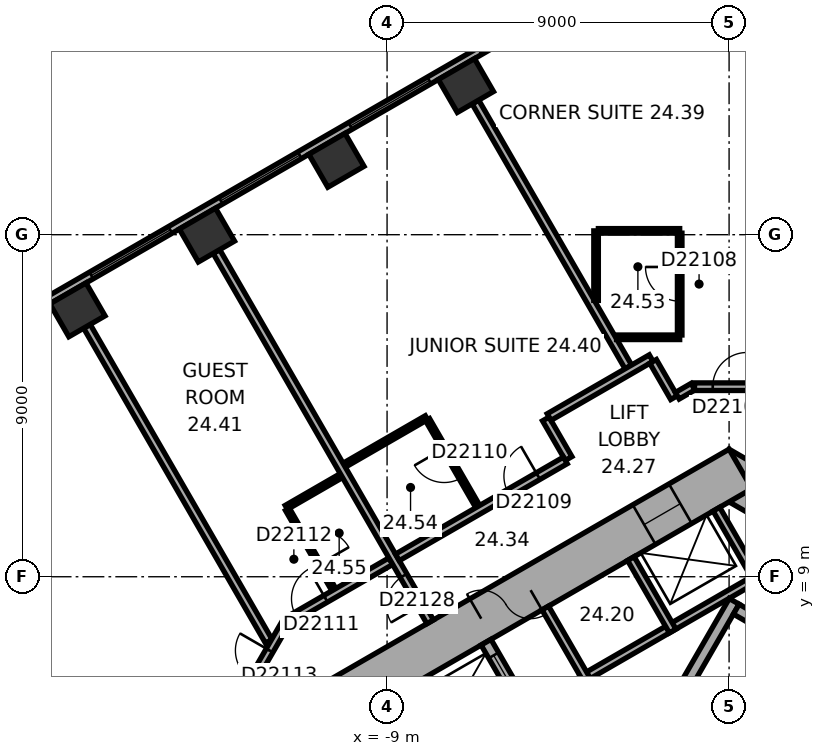
"""IFC4 building model, lengths in metres.
Left out: names, types, materials, properties, quantities, classifications, styles, units other than length and angle.
Written with IfcOpenShell. Run it as: python <this file> out.ifc"""

import sys

from ifc_helpers import new_model, si_unit, direction, frame, frame_2d, origin, origin_2d, place, context, subcontext, project, spatial, rectangle, extrude, element, fill, save


model = new_model("IFC4")
c1 = context("Model", 3, precision=1e-05, world=origin(), true_north=direction((0.0, 1.0)))
c2 = subcontext(c1, "Body", "Model", "MODEL_VIEW")
j1 = project(units=[si_unit("LENGTHUNIT", "METRE"), si_unit("PLANEANGLEUNIT", "RADIAN")], contexts=[c1])
p1 = place(None, origin())
s1 = spatial("IfcSite", under=j1, at=p1, CompositionType="ELEMENT")
p2 = place(p1, origin())
s2 = spatial("IfcBuilding", under=s1, at=p2, CompositionType="ELEMENT")
p3 = place(p2, frame((0.0, 0.0, 103.4)))
s3 = spatial("IfcBuildingStorey", under=s2, at=p3, CompositionType="ELEMENT", Elevation=103.4)
for number, where, z_axis, x_axis in (
    (1, (-6.926, 21.925, 0.0), (0.0, 0.0, 1.0), (-0.866, -0.5, 0.0)),
    (2, (-10.333, 19.957, 0.0), (0.0, 0.0, 1.0), (-0.866, -0.5, 0.0)),
    (3, (-13.74, 17.99, 0.0), (0.0, 0.0, 1.0), (-0.866, -0.5, 0.0)),
    (4, (-17.148, 16.023, 0.0), (0.0, 0.0, 1.0), (-0.866, -0.5, 0.0)),
):
    element("IfcColumn", number, at=place(p3, frame(where, z_axis=z_axis, x_axis=x_axis)), inside=s3, PredefinedType="COLUMN", context=c2, shape_type="SweptSolid", body=[
        extrude(rectangle(XDim=1.1, YDim=1.0, at=origin_2d()), origin(), (0.0, 0.0, 1.0), 3.3),
    ])
p4 = place(p3, frame((10.4, 5.658, 0.0), z_axis=(0.0, 0.0, 1.0), x_axis=(-0.866021384402, 0.500006961711, 0.0)))
e5 = element("IfcWall", 5, at=p4, inside=s3, PredefinedType="SHEAR", context=c2, shape_type="SweptSolid", body=[
    extrude(rectangle(XDim=12.355, YDim=1.2, at=frame_2d((6.178, 0.0))), origin(), (0.0, 0.0, 1.0), 3.3),
])
p5 = place(p4, frame((2.728, 0.0, 0.0)))
e6 = element("IfcOpeningElement", 6, at=p5, cuts=e5, PredefinedType="OPENING", context=c2, shape_type="SweptSolid", body=[
    extrude(rectangle(XDim=1.1, YDim=2.1, at=frame_2d((0.55, 1.05))), frame((0.0, 0.61, 0.0), z_axis=(0.0, -1.0, 0.0), x_axis=(1.0, 0.0, 0.0)), (0.0, 0.0, 1.0), 1.22),
])
p6 = place(p4, frame((5.328, 0.0, 0.0)))
e7 = element("IfcOpeningElement", 7, at=p6, cuts=e5, PredefinedType="OPENING", context=c2, shape_type="SweptSolid", body=[
    extrude(rectangle(XDim=1.1, YDim=2.1, at=frame_2d((0.55, 1.05))), frame((0.0, 0.61, 0.0), z_axis=(0.0, -1.0, 0.0), x_axis=(1.0, 0.0, 0.0)), (0.0, 0.0, 1.0), 1.22),
])
p7 = place(p4, frame((7.928, 0.0, 0.0)))
e8 = element("IfcOpeningElement", 8, at=p7, cuts=e5, PredefinedType="OPENING", context=c2, shape_type="SweptSolid", body=[
    extrude(rectangle(XDim=1.1, YDim=2.1, at=frame_2d((0.55, 1.05))), frame((0.0, 0.61, 0.0), z_axis=(0.0, -1.0, 0.0), x_axis=(1.0, 0.0, 0.0)), (0.0, 0.0, 1.0), 1.22),
])
p8 = place(p3, frame((0.3, 11.836, 0.0), z_axis=(0.0, 0.0, 1.0), x_axis=(-0.866021384402, -0.500006961711, 0.0)))
e9 = element("IfcWall", 9, at=p8, inside=s3, PredefinedType="SHEAR", context=c2, shape_type="SweptSolid", body=[
    extrude(rectangle(XDim=12.355, YDim=1.2, at=frame_2d((6.178, 0.0))), origin(), (0.0, 0.0, 1.0), 3.3),
])
p9 = place(p8, frame((6.378, 0.0, 0.0)))
e10 = element("IfcOpeningElement", 10, at=p9, cuts=e9, PredefinedType="OPENING", context=c2, shape_type="SweptSolid", body=[
    extrude(rectangle(XDim=1.5, YDim=2.1, at=frame_2d((0.75, 1.05))), frame((0.0, 0.61, 0.0), z_axis=(0.0, -1.0, 0.0), x_axis=(1.0, 0.0, 0.0)), (0.0, 0.0, 1.0), 1.22),
])
p10 = place(p8, frame((1.828, 0.0, 0.0)))
e11 = element("IfcOpeningElement", 11, at=p10, cuts=e9, PredefinedType="OPENING", context=c2, shape_type="SweptSolid", body=[
    extrude(rectangle(XDim=1.1, YDim=2.1, at=frame_2d((0.55, 1.05))), frame((0.0, 0.61, 0.0), z_axis=(0.0, -1.0, 0.0), x_axis=(1.0, 0.0, 0.0)), (0.0, 0.0, 1.0), 1.22),
])
p11 = place(p3, frame((-3.136, 24.805, 0.0), z_axis=(0.0, 0.0, 1.0), x_axis=(-0.866028291626, -0.499994998079, 0.0)))
e12 = element("IfcWall", 12, at=p11, inside=s3, PredefinedType="STANDARD", context=c2, shape_type="SweptSolid", body=[
    extrude(rectangle(XDim=21.246, YDim=0.2, at=frame_2d((10.623, 0.0))), origin(), (0.0, 0.0, 1.0), 3.3),
])
p12 = place(p11, frame((1.555, 0.0, 0.8)))
e13 = element("IfcOpeningElement", 13, at=p12, cuts=e12, PredefinedType="OPENING", context=c2, shape_type="SweptSolid", body=[
    extrude(rectangle(XDim=2.4, YDim=1.7, at=frame_2d((1.2, 0.85))), frame((0.0, 0.11, 0.0), z_axis=(0.0, -1.0, 0.0), x_axis=(1.0, 0.0, 0.0)), (0.0, 0.0, 1.0), 0.22),
])
p13 = place(p11, frame((5.489, 0.0, 0.8)))
e14 = element("IfcOpeningElement", 14, at=p13, cuts=e12, PredefinedType="OPENING", context=c2, shape_type="SweptSolid", body=[
    extrude(rectangle(XDim=2.4, YDim=1.7, at=frame_2d((1.2, 0.85))), frame((0.0, 0.11, 0.0), z_axis=(0.0, -1.0, 0.0), x_axis=(1.0, 0.0, 0.0)), (0.0, 0.0, 1.0), 0.22),
])
p14 = place(p11, frame((9.424, 0.0, 0.8)))
e15 = element("IfcOpeningElement", 15, at=p14, cuts=e12, PredefinedType="OPENING", context=c2, shape_type="SweptSolid", body=[
    extrude(rectangle(XDim=2.4, YDim=1.7, at=frame_2d((1.2, 0.85))), frame((0.0, 0.11, 0.0), z_axis=(0.0, -1.0, 0.0), x_axis=(1.0, 0.0, 0.0)), (0.0, 0.0, 1.0), 0.22),
])
p15 = place(p11, frame((13.358, 0.0, 0.8)))
e16 = element("IfcOpeningElement", 16, at=p15, cuts=e12, PredefinedType="OPENING", context=c2, shape_type="SweptSolid", body=[
    extrude(rectangle(XDim=2.4, YDim=1.7, at=frame_2d((1.2, 0.85))), frame((0.0, 0.11, 0.0), z_axis=(0.0, -1.0, 0.0), x_axis=(1.0, 0.0, 0.0)), (0.0, 0.0, 1.0), 0.22),
])
p16 = place(p11, frame((17.293, 0.0, 0.8)))
e17 = element("IfcOpeningElement", 17, at=p16, cuts=e12, PredefinedType="OPENING", context=c2, shape_type="SweptSolid", body=[
    extrude(rectangle(XDim=2.4, YDim=1.7, at=frame_2d((1.2, 0.85))), frame((0.0, 0.11, 0.0), z_axis=(0.0, -1.0, 0.0), x_axis=(1.0, 0.0, 0.0)), (0.0, 0.0, 1.0), 0.22),
])
p17 = place(p3, frame((0.803, 9.009, 0.0), z_axis=(0.0, 0.0, 1.0), x_axis=(-0.866028230842, -0.499995103361, 0.0)))
e18 = element("IfcWall", 18, at=p17, inside=s3, PredefinedType="PARTITIONING", context=c2, shape_type="SweptSolid", body=[
    extrude(rectangle(XDim=5.4, YDim=0.2, at=frame_2d((2.7, 0.0))), origin(), (0.0, 0.0, 1.0), 3.05),
])
p18 = place(p3, frame((0.767, 8.872, 0.0), z_axis=(0.0, 0.0, 1.0), x_axis=(-0.499994660107, 0.866028486751, 0.0)))
e19 = element("IfcWall", 19, at=p18, inside=s3, PredefinedType="PARTITIONING", context=c2, shape_type="SweptSolid", body=[
    extrude(rectangle(XDim=2.2, YDim=0.2, at=frame_2d((1.1, 0.0))), origin(), (0.0, 0.0, 1.0), 3.05),
])
for number, where, z_axis, x_axis in (
    (20, (-1.485, 7.572, 0.0), (0.0, 0.0, 1.0), (-0.5, 0.866, 0.0)),
    (21, (-3.737, 6.272, 0.0), (0.0, 0.0, 1.0), (-0.5, 0.866, 0.0)),
):
    element("IfcWall", number, at=place(p3, frame(where, z_axis=z_axis, x_axis=x_axis)), inside=s3, PredefinedType="PARTITIONING", context=c2, shape_type="SweptSolid", body=[
        extrude(rectangle(XDim=2.2, YDim=0.2, at=frame_2d((1.1, 0.0))), origin(), (0.0, 0.0, 1.0), 3.05),
    ])
p19 = place(p3, frame((-2.216, 4.282, 0.0), z_axis=(0.0, 0.0, 1.0), x_axis=(0.499977259774, 0.866038532462, 0.0)))
e22 = element("IfcWall", 22, at=p19, inside=s3, PredefinedType="SHEAR", context=c2, shape_type="SweptSolid", body=[
    extrude(rectangle(XDim=4.7, YDim=0.3, at=frame_2d((2.35, 0.0))), origin(), (0.0, 0.0, 1.0), 3.05),
])
p20 = place(p3, frame((6.303, 4.617, 0.0), z_axis=(0.0, 0.0, 1.0), x_axis=(-0.866027801685, 0.499995846692, 0.0)))
e23 = element("IfcWall", 23, at=p20, inside=s3, PredefinedType="SHEAR", context=c2, shape_type="SweptSolid", body=[
    extrude(rectangle(XDim=7.06, YDim=0.3, at=frame_2d((3.53, 0.0))), origin(), (0.0, 0.0, 1.0), 3.05),
])
p21 = place(p3, frame((-5.295, 5.372, 0.0), z_axis=(0.0, 0.0, 1.0), x_axis=(-0.500077893725, 0.86598042715, 0.0)))
e24 = element("IfcWall", 24, at=p21, inside=s3, PredefinedType="SHEAR", context=c2, shape_type="SweptSolid", body=[
    extrude(rectangle(XDim=2.2, YDim=0.3, at=frame_2d((1.1, 0.0))), origin(), (0.0, 0.0, 1.0), 3.05),
])
p22 = place(p21, frame((0.7, 0.0, 0.0)))
e25 = element("IfcOpeningElement", 25, at=p22, cuts=e24, PredefinedType="OPENING", context=c2, shape_type="SweptSolid", body=[
    extrude(rectangle(XDim=1.1, YDim=2.1, at=frame_2d((0.55, 1.05))), frame((0.0, 0.16, 0.0), z_axis=(0.0, -1.0, 0.0), x_axis=(1.0, 0.0, 0.0)), (0.0, 0.0, 1.0), 0.32),
])
p23 = place(p3, frame((-16.898, 15.59, 0.0), z_axis=(0.0, 0.0, 1.0), x_axis=(0.500023458698, -0.866011859475, 0.0)))
e26 = element("IfcWall", 26, at=p23, inside=s3, PredefinedType="PARTITIONING", context=c2, shape_type="SweptSolid", body=[
    extrude(rectangle(XDim=9.572, YDim=0.2, at=frame_2d((4.786, 0.0))), origin(), (0.0, 0.0, 1.0), 3.05),
])
p24 = place(p3, frame((-11.65, 7.823, 0.0), z_axis=(0.0, 0.0, 1.0), x_axis=(-0.500063520245, -0.865988727248, 0.0)))
e27 = element("IfcWall", 27, at=p24, inside=s3, PredefinedType="PARTITIONING", context=c2, shape_type="SweptSolid", body=[
    extrude(rectangle(XDim=1.9, YDim=0.2, at=frame_2d((0.95, 0.0))), origin(), (0.0, 0.0, 1.0), 3.05),
])
p25 = place(p24, frame((0.882, 0.0, 0.0)))
e28 = element("IfcOpeningElement", 28, at=p25, cuts=e27, PredefinedType="OPENING", context=c2, shape_type="SweptSolid", body=[
    extrude(rectangle(XDim=0.9, YDim=2.1, at=frame_2d((0.45, 1.05))), frame((0.0, 0.11, 0.0), z_axis=(0.0, -1.0, 0.0), x_axis=(1.0, 0.0, 0.0)), (0.0, 0.0, 1.0), 0.22),
])
p26 = place(p3, frame((-11.651, 10.825, 0.0), z_axis=(0.0, 0.0, 1.0), x_axis=(0.865998477143, 0.500046635412, 0.0)))
e29 = element("IfcWall", 29, at=p26, inside=s3, PredefinedType="PARTITIONING", context=c2, shape_type="SweptSolid", body=[
    extrude(rectangle(XDim=1.673, YDim=0.12, at=frame_2d((0.836, 0.0))), origin(), (0.0, 0.0, 1.0), 3.05),
])
p27 = place(p3, frame((-10.401, 8.66, 0.0), z_axis=(0.0, 0.0, 1.0), x_axis=(-0.500077547548, 0.865980627057, 0.0)))
e30 = element("IfcWall", 30, at=p27, inside=s3, PredefinedType="PARTITIONING", context=c2, shape_type="SweptSolid", body=[
    extrude(rectangle(XDim=2.44, YDim=0.12, at=frame_2d((1.22, 0.0))), origin(), (0.0, 0.0, 1.0), 3.05),
])
p28 = place(p27, frame((0.77, 0.0, 0.0)))
e31 = element("IfcOpeningElement", 31, at=p28, cuts=e30, PredefinedType="OPENING", context=c2, shape_type="SweptSolid", body=[
    extrude(rectangle(XDim=0.9, YDim=2.1, at=frame_2d((0.45, 1.05))), frame((0.0, 0.07, 0.0), z_axis=(0.0, -1.0, 0.0), x_axis=(1.0, 0.0, 0.0)), (0.0, 0.0, 1.0), 0.14),
])
p29 = place(p3, frame((-10.129, 11.935, 0.0), z_axis=(0.0, 0.0, 1.0), x_axis=(0.866047370643, 0.499961950354, 0.0)))
e32 = element("IfcWall", 32, at=p29, inside=s3, PredefinedType="PARTITIONING", context=c2, shape_type="SweptSolid", body=[
    extrude(rectangle(XDim=2.5, YDim=0.12, at=frame_2d((1.25, 0.0))), origin(), (0.0, 0.0, 1.0), 3.05),
])
p30 = place(p3, frame((-8.902, 9.41, 0.0), z_axis=(0.0, 0.0, 1.0), x_axis=(-0.866014299198, -0.500019233215, 0.0)))
e33 = element("IfcWall", 33, at=p30, inside=s3, PredefinedType="PARTITIONING", context=c2, shape_type="SweptSolid", body=[
    extrude(rectangle(XDim=3.133, YDim=0.2, at=frame_2d((1.567, 0.0))), origin(), (0.0, 0.0, 1.0), 3.05),
])
p31 = place(p30, frame((1.978, 0.0, 0.0)))
e34 = element("IfcOpeningElement", 34, at=p31, cuts=e33, PredefinedType="OPENING", context=c2, shape_type="SweptSolid", body=[
    extrude(rectangle(XDim=0.9, YDim=2.1, at=frame_2d((0.45, 1.05))), frame((0.0, 0.11, 0.0), z_axis=(0.0, -1.0, 0.0), x_axis=(1.0, 0.0, 0.0)), (0.0, 0.0, 1.0), 0.22),
])
p32 = place(p3, frame((-7.934, 13.133, 0.0), z_axis=(0.0, 0.0, 1.0), x_axis=(0.499938597367, -0.866060851709, 0.0)))
e35 = element("IfcWall", 35, at=p32, inside=s3, PredefinedType="PARTITIONING", context=c2, shape_type="SweptSolid", body=[
    extrude(rectangle(XDim=2.64, YDim=0.12, at=frame_2d((1.32, 0.0))), origin(), (0.0, 0.0, 1.0), 3.05),
])
p33 = place(p32, frame((0.87, 0.0, 0.0)))
e36 = element("IfcOpeningElement", 36, at=p33, cuts=e35, PredefinedType="OPENING", context=c2, shape_type="SweptSolid", body=[
    extrude(rectangle(XDim=0.9, YDim=2.1, at=frame_2d((0.45, 1.05))), frame((0.0, 0.07, 0.0), z_axis=(0.0, -1.0, 0.0), x_axis=(1.0, 0.0, 0.0)), (0.0, 0.0, 1.0), 0.14),
])
p34 = place(p3, frame((-7.865, 7.814, 0.0), z_axis=(0.0, 0.0, 1.0), x_axis=(-0.500004234368, 0.866022959057, 0.0)))
e37 = element("IfcWall", 37, at=p34, inside=s3, PredefinedType="PARTITIONING", context=c2, shape_type="SweptSolid", body=[
    extrude(rectangle(XDim=11.25, YDim=0.2, at=frame_2d((5.625, 0.0))), origin(), (0.0, 0.0, 1.0), 3.05),
])
p35 = place(p34, frame((0.5, 0.0, 0.0)))
e38 = element("IfcOpeningElement", 38, at=p35, cuts=e37, PredefinedType="OPENING", context=c2, shape_type="SweptSolid", body=[
    extrude(rectangle(XDim=0.9, YDim=2.1, at=frame_2d((0.45, 1.05))), frame((0.0, 0.11, 0.0), z_axis=(0.0, -1.0, 0.0), x_axis=(1.0, 0.0, 0.0)), (0.0, 0.0, 1.0), 0.22),
])
p36 = place(p3, frame((-6.676, 21.492, 0.0), z_axis=(0.0, 0.0, 1.0), x_axis=(0.500011263043, -0.866018900966, 0.0)))
e39 = element("IfcWall", 39, at=p36, inside=s3, PredefinedType="PARTITIONING", context=c2, shape_type="SweptSolid", body=[
    extrude(rectangle(XDim=8.049, YDim=0.2, at=frame_2d((4.024, 0.0))), origin(), (0.0, 0.0, 1.0), 3.05),
])
p37 = place(p3, frame((-4.823, 13.152, 0.0), z_axis=(0.0, 0.0, 1.0), x_axis=(0.499986357472, -0.866033280158, 0.0)))
e40 = element("IfcWall", 40, at=p37, inside=s3, PredefinedType="PARTITIONING", context=c2, shape_type="SweptSolid", body=[
    extrude(rectangle(XDim=1.201, YDim=0.2, at=frame_2d((0.601, 0.0))), origin(), (0.0, 0.0, 1.0), 3.05),
])
p38 = place(p3, frame((-4.309, 12.061, 0.0), z_axis=(0.0, 0.0, 1.0), x_axis=(-0.866020679205, -0.500008183122, 0.0)))
e41 = element("IfcWall", 41, at=p38, inside=s3, PredefinedType="PARTITIONING", context=c2, shape_type="SweptSolid", body=[
    extrude(rectangle(XDim=5.104, YDim=0.2, at=frame_2d((2.552, 0.0))), origin(), (0.0, 0.0, 1.0), 3.05),
])
p39 = place(p38, frame((0.827, 0.0, 0.0)))
e42 = element("IfcOpeningElement", 42, at=p39, cuts=e41, PredefinedType="OPENING", context=c2, shape_type="SweptSolid", body=[
    extrude(rectangle(XDim=0.9, YDim=2.1, at=frame_2d((0.45, 1.05))), frame((0.0, 0.11, 0.0), z_axis=(0.0, -1.0, 0.0), x_axis=(1.0, 0.0, 0.0)), (0.0, 0.0, 1.0), 0.22),
])
p40 = place(p3, frame((-3.5, 16.271, 0.0), z_axis=(0.0, 0.0, 1.0), x_axis=(0.0, 1.0, 0.0)))
e43 = element("IfcWall", 43, at=p40, inside=s3, PredefinedType="PARTITIONING", context=c2, shape_type="SweptSolid", body=[
    extrude(rectangle(XDim=1.829, YDim=0.12, at=frame_2d((0.915, 0.0))), origin(), (0.0, 0.0, 1.0), 3.05),
])
p41 = place(p3, frame((-3.44, 18.101, 0.0), z_axis=(0.0, 0.0, 1.0), x_axis=(1.0, 0.0, 0.0)))
e44 = element("IfcWall", 44, at=p41, inside=s3, PredefinedType="PARTITIONING", context=c2, shape_type="SweptSolid", body=[
    extrude(rectangle(XDim=2.14, YDim=0.12, at=frame_2d((1.07, 0.0))), origin(), (0.0, 0.0, 1.0), 3.05),
])
p42 = place(p3, frame((-2.05, 14.752, 0.0), z_axis=(0.0, 0.0, 1.0), x_axis=(-0.866030936828, -0.499990416364, 0.0)))
e45 = element("IfcWall", 45, at=p42, inside=s3, PredefinedType="PARTITIONING", context=c2, shape_type="SweptSolid", body=[
    extrude(rectangle(XDim=3.102, YDim=0.2, at=frame_2d((1.551, 0.0))), origin(), (0.0, 0.0, 1.0), 3.05),
])
p43 = place(p3, frame((-1.449, 13.712, 0.0), z_axis=(0.0, 0.0, 1.0), x_axis=(-0.499978356969, 0.866037899034, 0.0)))
e46 = element("IfcWall", 46, at=p43, inside=s3, PredefinedType="PARTITIONING", context=c2, shape_type="SweptSolid", body=[
    extrude(rectangle(XDim=1.101, YDim=0.2, at=frame_2d((0.551, 0.0))), origin(), (0.0, 0.0, 1.0), 3.05),
])
p44 = place(p3, frame((-1.3, 15.301, 0.0), z_axis=(0.0, 0.0, 1.0), x_axis=(-1.0, 0.0, 0.0)))
e47 = element("IfcWall", 47, at=p44, inside=s3, PredefinedType="PARTITIONING", context=c2, shape_type="SweptSolid", body=[
    extrude(rectangle(XDim=1.661, YDim=0.12, at=frame_2d((0.831, 0.0))), origin(), (0.0, 0.0, 1.0), 3.05),
])
p45 = place(p3, frame((-1.3, 18.041, 0.0), z_axis=(0.0, 0.0, 1.0), x_axis=(0.0, -1.0, 0.0)))
e48 = element("IfcWall", 48, at=p45, inside=s3, PredefinedType="PARTITIONING", context=c2, shape_type="SweptSolid", body=[
    extrude(rectangle(XDim=2.68, YDim=0.12, at=frame_2d((1.34, 0.0))), origin(), (0.0, 0.0, 1.0), 3.05),
])
p46 = place(p45, frame((0.89, 0.0, 0.0)))
e49 = element("IfcOpeningElement", 49, at=p46, cuts=e48, PredefinedType="OPENING", context=c2, shape_type="SweptSolid", body=[
    extrude(rectangle(XDim=0.9, YDim=2.1, at=frame_2d((0.45, 1.05))), frame((0.0, 0.07, 0.0), z_axis=(0.0, -1.0, 0.0), x_axis=(1.0, 0.0, 0.0)), (0.0, 0.0, 1.0), 0.14),
])
p47 = place(p3, frame((-0.95, 14.001, 0.0), z_axis=(0.0, 0.0, 1.0), x_axis=(-0.86609177584, -0.499885022602, 0.0)))
e50 = element("IfcWall", 50, at=p47, inside=s3, PredefinedType="PARTITIONING", context=c2, shape_type="SweptSolid", body=[
    extrude(rectangle(XDim=0.477, YDim=0.2, at=frame_2d((0.238, 0.0))), origin(), (0.0, 0.0, 1.0), 3.05),
])
p48 = place(p3, frame((0.95, 14.001, 0.0), z_axis=(0.0, 0.0, 1.0), x_axis=(-1.0, 0.0, 0.0)))
e51 = element("IfcWall", 51, at=p48, inside=s3, PredefinedType="PARTITIONING", context=c2, shape_type="SweptSolid", body=[
    extrude(rectangle(XDim=1.86, YDim=0.2, at=frame_2d((0.93, 0.0))), origin(), (0.0, 0.0, 1.0), 3.05),
])
p49 = place(p48, frame((0.48, 0.0, 0.0)))
e52 = element("IfcOpeningElement", 52, at=p49, cuts=e51, PredefinedType="OPENING", context=c2, shape_type="SweptSolid", body=[
    extrude(rectangle(XDim=0.9, YDim=2.1, at=frame_2d((0.45, 1.05))), frame((0.0, 0.11, 0.0), z_axis=(0.0, -1.0, 0.0), x_axis=(1.0, 0.0, 0.0)), (0.0, 0.0, 1.0), 0.22),
])
p50 = place(p13, origin())
e53 = element("IfcWindow", 53, at=p50, inside=s3, PartitioningType="SINGLE_PANEL", PredefinedType="WINDOW", context=c2, shape_type="SweptSolid", body=[
    extrude(rectangle(XDim=2.4, YDim=1.7, at=frame_2d((1.2, 0.85))), frame((0.0, 0.03, 0.0), z_axis=(0.0, -1.0, 0.0), x_axis=(1.0, 0.0, 0.0)), (0.0, 0.0, 1.0), 0.06),
])
fill(e14, e53)
p51 = place(p14, origin())
e54 = element("IfcWindow", 54, at=p51, inside=s3, PartitioningType="SINGLE_PANEL", PredefinedType="WINDOW", context=c2, shape_type="SweptSolid", body=[
    extrude(rectangle(XDim=2.4, YDim=1.7, at=frame_2d((1.2, 0.85))), frame((0.0, 0.03, 0.0), z_axis=(0.0, -1.0, 0.0), x_axis=(1.0, 0.0, 0.0)), (0.0, 0.0, 1.0), 0.06),
])
fill(e15, e54)
p52 = place(p15, origin())
e55 = element("IfcWindow", 55, at=p52, inside=s3, PartitioningType="SINGLE_PANEL", PredefinedType="WINDOW", context=c2, shape_type="SweptSolid", body=[
    extrude(rectangle(XDim=2.4, YDim=1.7, at=frame_2d((1.2, 0.85))), frame((0.0, 0.03, 0.0), z_axis=(0.0, -1.0, 0.0), x_axis=(1.0, 0.0, 0.0)), (0.0, 0.0, 1.0), 0.06),
])
fill(e16, e55)
p53 = place(p9, origin())
e56 = element("IfcDoor", 56, at=p53, inside=s3, OperationType="DOUBLE_DOOR_SINGLE_SWING", PredefinedType="DOOR", context=c2, shape_type="SweptSolid", body=[
    extrude(rectangle(XDim=1.5, YDim=2.1, at=frame_2d((0.75, 1.05))), frame((0.0, 0.025, 0.0), z_axis=(0.0, -1.0, 0.0), x_axis=(1.0, 0.0, 0.0)), (0.0, 0.0, 1.0), 0.05),
])
fill(e10, e56)
p54 = place(p22, origin())
e57 = element("IfcDoor", 57, at=p54, inside=s3, OperationType="DOUBLE_DOOR_SLIDING", PredefinedType="DOOR", context=c2, shape_type="SweptSolid", body=[
    extrude(rectangle(XDim=1.1, YDim=2.1, at=frame_2d((0.55, 1.05))), frame((0.0, 0.025, 0.0), z_axis=(0.0, -1.0, 0.0), x_axis=(1.0, 0.0, 0.0)), (0.0, 0.0, 1.0), 0.05),
])
fill(e25, e57)
p55 = place(p10, origin())
e58 = element("IfcDoor", 58, at=p55, inside=s3, OperationType="DOUBLE_DOOR_SLIDING", PredefinedType="DOOR", context=c2, shape_type="SweptSolid", body=[
    extrude(rectangle(XDim=1.1, YDim=2.1, at=frame_2d((0.55, 1.05))), frame((0.0, 0.025, 0.0), z_axis=(0.0, -1.0, 0.0), x_axis=(1.0, 0.0, 0.0)), (0.0, 0.0, 1.0), 0.05),
])
fill(e11, e58)
p56 = place(p49, origin())
e59 = element("IfcDoor", 59, at=p56, inside=s3, OperationType="SINGLE_SWING_LEFT", PredefinedType="DOOR", context=c2, shape_type="SweptSolid", body=[
    extrude(rectangle(XDim=0.9, YDim=2.1, at=frame_2d((0.45, 1.05))), frame((0.0, 0.025, 0.0), z_axis=(0.0, -1.0, 0.0), x_axis=(1.0, 0.0, 0.0)), (0.0, 0.0, 1.0), 0.05),
])
fill(e52, e59)
p57 = place(p46, origin())
e60 = element("IfcDoor", 60, at=p57, inside=s3, OperationType="SINGLE_SWING_LEFT", PredefinedType="DOOR", context=c2, shape_type="SweptSolid", body=[
    extrude(rectangle(XDim=0.9, YDim=2.1, at=frame_2d((0.45, 1.05))), frame((0.0, 0.025, 0.0), z_axis=(0.0, -1.0, 0.0), x_axis=(1.0, 0.0, 0.0)), (0.0, 0.0, 1.0), 0.05),
])
fill(e49, e60)
p58 = place(p39, origin())
e61 = element("IfcDoor", 61, at=p58, inside=s3, OperationType="SINGLE_SWING_LEFT", PredefinedType="DOOR", context=c2, shape_type="SweptSolid", body=[
    extrude(rectangle(XDim=0.9, YDim=2.1, at=frame_2d((0.45, 1.05))), frame((0.0, 0.025, 0.0), z_axis=(0.0, -1.0, 0.0), x_axis=(1.0, 0.0, 0.0)), (0.0, 0.0, 1.0), 0.05),
])
fill(e42, e61)
p59 = place(p33, origin())
e62 = element("IfcDoor", 62, at=p59, inside=s3, OperationType="SINGLE_SWING_LEFT", PredefinedType="DOOR", context=c2, shape_type="SweptSolid", body=[
    extrude(rectangle(XDim=0.9, YDim=2.1, at=frame_2d((0.45, 1.05))), frame((0.0, 0.025, 0.0), z_axis=(0.0, -1.0, 0.0), x_axis=(1.0, 0.0, 0.0)), (0.0, 0.0, 1.0), 0.05),
])
fill(e36, e62)
p60 = place(p31, origin())
e63 = element("IfcDoor", 63, at=p60, inside=s3, OperationType="SINGLE_SWING_LEFT", PredefinedType="DOOR", context=c2, shape_type="SweptSolid", body=[
    extrude(rectangle(XDim=0.9, YDim=2.1, at=frame_2d((0.45, 1.05))), frame((0.0, 0.025, 0.0), z_axis=(0.0, -1.0, 0.0), x_axis=(1.0, 0.0, 0.0)), (0.0, 0.0, 1.0), 0.05),
])
fill(e34, e63)
p61 = place(p28, origin())
e64 = element("IfcDoor", 64, at=p61, inside=s3, OperationType="SINGLE_SWING_LEFT", PredefinedType="DOOR", context=c2, shape_type="SweptSolid", body=[
    extrude(rectangle(XDim=0.9, YDim=2.1, at=frame_2d((0.45, 1.05))), frame((0.0, 0.025, 0.0), z_axis=(0.0, -1.0, 0.0), x_axis=(1.0, 0.0, 0.0)), (0.0, 0.0, 1.0), 0.05),
])
fill(e31, e64)
p62 = place(p25, origin())
e65 = element("IfcDoor", 65, at=p62, inside=s3, OperationType="SINGLE_SWING_LEFT", PredefinedType="DOOR", context=c2, shape_type="SweptSolid", body=[
    extrude(rectangle(XDim=0.9, YDim=2.1, at=frame_2d((0.45, 1.05))), frame((0.0, 0.025, 0.0), z_axis=(0.0, -1.0, 0.0), x_axis=(1.0, 0.0, 0.0)), (0.0, 0.0, 1.0), 0.05),
])
fill(e28, e65)
p63 = place(p35, origin())
e66 = element("IfcDoor", 66, at=p63, inside=s3, OperationType="SINGLE_SWING_LEFT", PredefinedType="DOOR", context=c2, shape_type="SweptSolid", body=[
    extrude(rectangle(XDim=0.9, YDim=2.1, at=frame_2d((0.45, 1.05))), frame((0.0, 0.025, 0.0), z_axis=(0.0, -1.0, 0.0), x_axis=(1.0, 0.0, 0.0)), (0.0, 0.0, 1.0), 0.05),
])
fill(e38, e66)
save(model, sys.argv[1])
